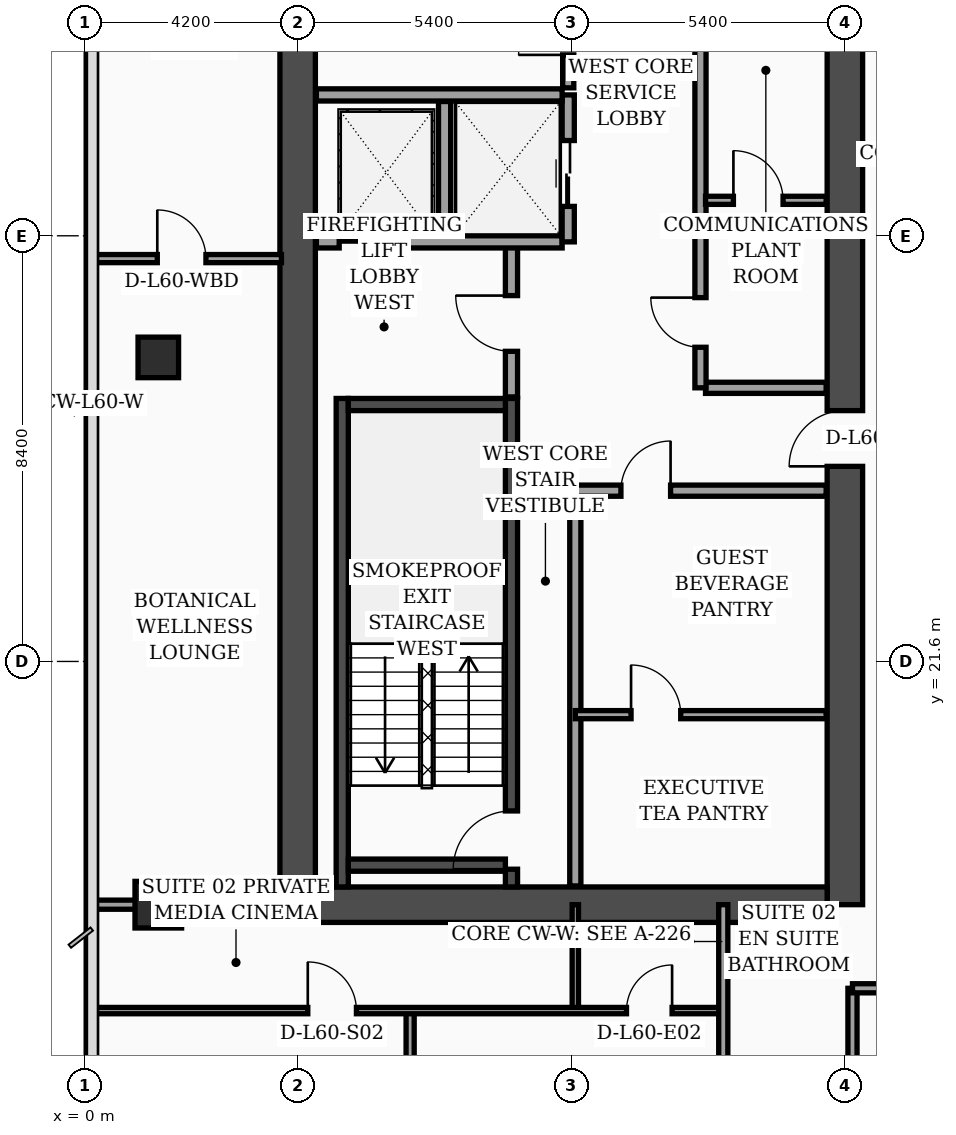
"""IFC4 building model, lengths in metres.
Left out: names, types, materials, properties, quantities, classifications, styles, units other than length and angle.
Written with IfcOpenShell. Run it as: python <this file> out.ifc"""

import sys

from ifc_helpers import new_model, si_unit, direction, frame, frame_2d, origin, origin_2d, place, context, subcontext, project, spatial, rectangle, extrude, element, fill, save


model = new_model("IFC4")
c1 = context("Model", 3, precision=1e-05, world=origin(), true_north=direction((0.0, 1.0)))
c2 = subcontext(c1, "Body", "Model", "MODEL_VIEW")
j1 = project(units=[si_unit("LENGTHUNIT", "METRE"), si_unit("PLANEANGLEUNIT", "RADIAN")], contexts=[c1])
p1 = place(None, origin())
s1 = spatial("IfcSite", under=j1, at=p1, CompositionType="ELEMENT")
p2 = place(p1, origin())
s2 = spatial("IfcBuilding", under=s1, at=p2, CompositionType="ELEMENT")
p3 = place(p2, frame((0.0, 0.0, 243.8)))
s3 = spatial("IfcBuildingStorey", under=s2, at=p3, CompositionType="ELEMENT", Elevation=243.8)
p4 = place(p3, frame((4.2, 16.8, 0.0), z_axis=(0.0, 0.0, 1.0), x_axis=(0.0, 1.0, 0.0)))
e1 = element("IfcWall", 1, at=p4, inside=s3, PredefinedType="SHEAR", context=c2, shape_type="SweptSolid", body=[
    extrude(rectangle(XDim=21.6, YDim=0.7, at=frame_2d((10.8, 0.0))), origin(), (0.0, 0.0, 1.0), 3.56),
])
p5 = place(p3, frame((15.0, 16.8, 0.0), z_axis=(0.0, 0.0, 1.0), x_axis=(0.0, 1.0, 0.0)))
e2 = element("IfcWall", 2, at=p5, inside=s3, PredefinedType="SHEAR", context=c2, shape_type="SweptSolid", body=[
    extrude(rectangle(XDim=21.6, YDim=0.7, at=frame_2d((10.8, 0.0))), origin(), (0.0, 0.0, 1.0), 3.56),
])
p6 = place(p5, frame((8.65, 0.0, 0.0)))
e3 = element("IfcOpeningElement", 3, at=p6, cuts=e2, PredefinedType="OPENING", context=c2, shape_type="SweptSolid", body=[
    extrude(rectangle(XDim=1.1, YDim=2.2, at=frame_2d((0.55, 1.1))), frame((0.0, 0.36, 0.0), z_axis=(0.0, -1.0, 0.0), x_axis=(1.0, 0.0, 0.0)), (0.0, 0.0, 1.0), 0.72),
])
p7 = place(p5, frame((18.9, 0.0, 0.0)))
e4 = element("IfcOpeningElement", 4, at=p7, cuts=e2, PredefinedType="OPENING", context=c2, shape_type="SweptSolid", body=[
    extrude(rectangle(XDim=1.1, YDim=2.2, at=frame_2d((0.55, 1.1))), frame((0.0, 0.36, 0.0), z_axis=(0.0, -1.0, 0.0), x_axis=(1.0, 0.0, 0.0)), (0.0, 0.0, 1.0), 0.72),
])
p8 = place(p3, frame((4.55, 16.8, 0.0), z_axis=(0.0, 0.0, 1.0), x_axis=(1.0, 0.0, 0.0)))
e5 = element("IfcWall", 5, at=p8, inside=s3, PredefinedType="SHEAR", context=c2, shape_type="SweptSolid", body=[
    extrude(rectangle(XDim=10.1, YDim=0.7, at=frame_2d((5.05, 0.0))), origin(), (0.0, 0.0, 1.0), 3.56),
])
p9 = place(p3, frame((5.08, 17.15, 0.0), z_axis=(0.0, 0.0, 1.0), x_axis=(0.0, 1.0, 0.0)))
e6 = element("IfcWall", 6, at=p9, inside=s3, PredefinedType="SOLIDWALL", context=c2, shape_type="SweptSolid", body=[
    extrude(rectangle(XDim=9.64, YDim=0.24, at=frame_2d((4.82, 0.0))), origin(), (0.0, 0.0, 1.0), 3.56),
])
p10 = place(p3, frame((8.42, 17.15, 0.0), z_axis=(0.0, 0.0, 1.0), x_axis=(0.0, 1.0, 0.0)))
e7 = element("IfcWall", 7, at=p10, inside=s3, PredefinedType="SOLIDWALL", context=c2, shape_type="SweptSolid", body=[
    extrude(rectangle(XDim=9.64, YDim=0.24, at=frame_2d((4.82, 0.0))), origin(), (0.0, 0.0, 1.0), 3.56),
])
p11 = place(p10, frame((0.35, 0.0, 0.0)))
e8 = element("IfcOpeningElement", 8, at=p11, cuts=e7, PredefinedType="OPENING", context=c2, shape_type="SweptSolid", body=[
    extrude(rectangle(XDim=1.15, YDim=2.2, at=frame_2d((0.575, 1.1))), frame((0.0, 0.13, 0.0), z_axis=(0.0, -1.0, 0.0), x_axis=(1.0, 0.0, 0.0)), (0.0, 0.0, 1.0), 0.26),
])
for number, where, z_axis, x_axis in (
    (9, (5.2, 17.58, 0.0), (0.0, 0.0, 1.0), (1.0, 0.0, 0.0)),
    (10, (5.2, 26.67, 0.0), (0.0, 0.0, 1.0), (1.0, 0.0, 0.0)),
):
    element("IfcWall", number, at=place(p3, frame(where, z_axis=z_axis, x_axis=x_axis)), inside=s3, PredefinedType="SOLIDWALL", context=c2, shape_type="SweptSolid", body=[
        extrude(rectangle(XDim=3.1, YDim=0.24, at=frame_2d((1.55, 0.0))), origin(), (0.0, 0.0, 1.0), 3.56),
    ])
p12 = place(p3, frame((1.45, 16.8, 0.0), z_axis=(0.0, 0.0, 1.0), x_axis=(1.0, 0.0, 0.0)))
e11 = element("IfcColumn", 11, at=p12, inside=s3, PredefinedType="COLUMN", context=c2, shape_type="SweptSolid", body=[
    extrude(rectangle(XDim=0.92, YDim=0.92, at=origin_2d()), origin(), (0.0, 0.0, 1.0), 3.56),
])
p13 = place(p3, frame((1.45, 27.6, 0.0), z_axis=(0.0, 0.0, 1.0), x_axis=(1.0, 0.0, 0.0)))
e12 = element("IfcColumn", 12, at=p13, inside=s3, PredefinedType="COLUMN", context=c2, shape_type="SweptSolid", body=[
    extrude(rectangle(XDim=0.8, YDim=0.8, at=origin_2d()), origin(), (0.0, 0.0, 1.0), 3.56),
])
p14 = place(p3, frame((8.42, 26.82, 0.0), z_axis=(0.0, 0.0, 1.0), x_axis=(0.0, 1.0, 0.0)))
e13 = element("IfcWall", 13, at=p14, inside=s3, PredefinedType="SOLIDWALL", context=c2, shape_type="SweptSolid", body=[
    extrude(rectangle(XDim=3.0, YDim=0.24, at=frame_2d((1.5, 0.0))), origin(), (0.0, 0.0, 1.0), 3.56),
])
p15 = place(p14, frame((0.9, 0.0, 0.0)))
e14 = element("IfcOpeningElement", 14, at=p15, cuts=e13, PredefinedType="OPENING", context=c2, shape_type="SweptSolid", body=[
    extrude(rectangle(XDim=1.1, YDim=2.2, at=frame_2d((0.55, 1.1))), frame((0.0, 0.13, 0.0), z_axis=(0.0, -1.0, 0.0), x_axis=(1.0, 0.0, 0.0)), (0.0, 0.0, 1.0), 0.26),
])
p16 = place(p3, frame((4.57, 29.88, 0.0), z_axis=(0.0, 0.0, 1.0), x_axis=(1.0, 0.0, 0.0)))
e15 = element("IfcWall", 15, at=p16, inside=s3, PredefinedType="SOLIDWALL", context=c2, shape_type="SweptSolid", body=[
    extrude(rectangle(XDim=4.85, YDim=0.24, at=frame_2d((2.425, 0.0))), origin(), (0.0, 0.0, 1.0), 3.56),
])
p17 = place(p16, frame((0.45, 0.0, 0.0)))
e16 = element("IfcOpeningElement", 16, at=p17, cuts=e15, PredefinedType="OPENING", context=c2, shape_type="SweptSolid", body=[
    extrude(rectangle(XDim=1.3, YDim=2.35, at=frame_2d((0.65, 1.175))), frame((0.0, 0.13, 0.0), z_axis=(0.0, -1.0, 0.0), x_axis=(1.0, 0.0, 0.0)), (0.0, 0.0, 1.0), 0.26),
])
p18 = place(p3, frame((7.1, 30.02, 0.0), z_axis=(0.0, 0.0, 1.0), x_axis=(0.0, 1.0, 0.0)))
e17 = element("IfcWall", 17, at=p18, inside=s3, PredefinedType="SOLIDWALL", context=c2, shape_type="SweptSolid", body=[
    extrude(rectangle(XDim=2.63, YDim=0.24, at=frame_2d((1.315, 0.0))), origin(), (0.0, 0.0, 1.0), 3.56),
])
p19 = place(p3, frame((9.54, 29.88, 0.0), z_axis=(0.0, 0.0, 1.0), x_axis=(0.0, 1.0, 0.0)))
e18 = element("IfcWall", 18, at=p19, inside=s3, PredefinedType="SOLIDWALL", context=c2, shape_type="SweptSolid", body=[
    extrude(rectangle(XDim=2.9, YDim=0.24, at=frame_2d((1.45, 0.0))), origin(), (0.0, 0.0, 1.0), 3.56),
])
p20 = place(p19, frame((0.7, 0.0, 0.0)))
e19 = element("IfcOpeningElement", 19, at=p20, cuts=e18, PredefinedType="OPENING", context=c2, shape_type="SweptSolid", body=[
    extrude(rectangle(XDim=1.3, YDim=2.35, at=frame_2d((0.65, 1.175))), frame((0.0, 0.13, 0.0), z_axis=(0.0, -1.0, 0.0), x_axis=(1.0, 0.0, 0.0)), (0.0, 0.0, 1.0), 0.26),
])
p21 = place(p3, frame((4.57, 32.78, 0.0), z_axis=(0.0, 0.0, 1.0), x_axis=(1.0, 0.0, 0.0)))
e20 = element("IfcWall", 20, at=p21, inside=s3, PredefinedType="SOLIDWALL", context=c2, shape_type="SweptSolid", body=[
    extrude(rectangle(XDim=4.85, YDim=0.24, at=frame_2d((2.425, 0.0))), origin(), (0.0, 0.0, 1.0), 3.19),
])
p22 = place(p3, frame((9.68, 17.17, 0.0), z_axis=(0.0, 0.0, 1.0), x_axis=(0.0, 1.0, 0.0)))
e21 = element("IfcWall", 21, at=p22, inside=s3, PredefinedType="SOLIDWALL", context=c2, shape_type="SweptSolid", body=[
    extrude(rectangle(XDim=7.83, YDim=0.22, at=frame_2d((3.915, 0.0))), origin(), (0.0, 0.0, 1.0), 3.56),
])
p23 = place(p3, frame((9.54, 32.92, 0.0), z_axis=(0.0, 0.0, 1.0), x_axis=(0.0, 1.0, 0.0)))
e22 = element("IfcWall", 22, at=p23, inside=s3, PredefinedType="SOLIDWALL", context=c2, shape_type="SweptSolid", body=[
    extrude(rectangle(XDim=5.11, YDim=0.22, at=frame_2d((2.555, 0.0))), origin(), (0.0, 0.0, 1.0), 3.56),
])
p24 = place(p23, frame((0.65, 0.0, 0.0)))
e23 = element("IfcOpeningElement", 23, at=p24, cuts=e22, PredefinedType="OPENING", context=c2, shape_type="SweptSolid", body=[
    extrude(rectangle(XDim=0.98, YDim=2.15, at=frame_2d((0.49, 1.075))), frame((0.0, 0.12, 0.0), z_axis=(0.0, -1.0, 0.0), x_axis=(1.0, 0.0, 0.0)), (0.0, 0.0, 1.0), 0.24),
])
p25 = place(p3, frame((9.68, 20.55, 0.0), z_axis=(0.0, 0.0, 1.0), x_axis=(1.0, 0.0, 0.0)))
e24 = element("IfcWall", 24, at=p25, inside=s3, PredefinedType="PARTITIONING", context=c2, shape_type="SweptSolid", body=[
    extrude(rectangle(XDim=4.95, YDim=0.16, at=frame_2d((2.475, 0.0))), origin(), (0.0, 0.0, 1.0), 3.56),
])
p26 = place(p25, frame((1.1, 0.0, 0.0)))
e25 = element("IfcOpeningElement", 25, at=p26, cuts=e24, PredefinedType="OPENING", context=c2, shape_type="SweptSolid", body=[
    extrude(rectangle(XDim=0.98, YDim=2.15, at=frame_2d((0.49, 1.075))), frame((0.0, 0.09, 0.0), z_axis=(0.0, -1.0, 0.0), x_axis=(1.0, 0.0, 0.0)), (0.0, 0.0, 1.0), 0.18),
])
p27 = place(p3, frame((9.68, 24.97, 0.0), z_axis=(0.0, 0.0, 1.0), x_axis=(1.0, 0.0, 0.0)))
e26 = element("IfcWall", 26, at=p27, inside=s3, PredefinedType="SOLIDWALL", context=c2, shape_type="SweptSolid", body=[
    extrude(rectangle(XDim=4.95, YDim=0.22, at=frame_2d((2.475, 0.0))), origin(), (0.0, 0.0, 1.0), 2.99),
])
p28 = place(p27, frame((0.9, 0.0, 0.0)))
e27 = element("IfcOpeningElement", 27, at=p28, cuts=e26, PredefinedType="OPENING", context=c2, shape_type="SweptSolid", body=[
    extrude(rectangle(XDim=0.98, YDim=2.15, at=frame_2d((0.49, 1.075))), frame((0.0, 0.12, 0.0), z_axis=(0.0, -1.0, 0.0), x_axis=(1.0, 0.0, 0.0)), (0.0, 0.0, 1.0), 0.24),
])
p29 = place(p3, frame((12.25, 27.0, 0.0), z_axis=(0.0, 0.0, 1.0), x_axis=(1.0, 0.0, 0.0)))
e28 = element("IfcWall", 28, at=p29, inside=s3, PredefinedType="SOLIDWALL", context=c2, shape_type="SweptSolid", body=[
    extrude(rectangle(XDim=2.38, YDim=0.22, at=frame_2d((1.19, 0.0))), origin(), (0.0, 0.0, 1.0), 3.56),
])
p30 = place(p3, frame((12.15, 27.0, 0.0), z_axis=(0.0, 0.0, 1.0), x_axis=(0.0, 1.0, 0.0)))
e29 = element("IfcWall", 29, at=p30, inside=s3, PredefinedType="SOLIDWALL", context=c2, shape_type="SweptSolid", body=[
    extrude(rectangle(XDim=7.75, YDim=0.22, at=frame_2d((3.875, 0.0))), origin(), (0.0, 0.0, 1.0), 3.56),
])
p31 = place(p30, frame((0.8, 0.0, 0.0)))
e30 = element("IfcOpeningElement", 30, at=p31, cuts=e29, PredefinedType="OPENING", context=c2, shape_type="SweptSolid", body=[
    extrude(rectangle(XDim=0.98, YDim=2.15, at=frame_2d((0.49, 1.075))), frame((0.0, 0.12, 0.0), z_axis=(0.0, -1.0, 0.0), x_axis=(1.0, 0.0, 0.0)), (0.0, 0.0, 1.0), 0.24),
])
p32 = place(p3, frame((12.25, 30.7, 0.0), z_axis=(0.0, 0.0, 1.0), x_axis=(1.0, 0.0, 0.0)))
e31 = element("IfcWall", 31, at=p32, inside=s3, PredefinedType="PARTITIONING", context=c2, shape_type="SweptSolid", body=[
    extrude(rectangle(XDim=2.38, YDim=0.16, at=frame_2d((1.19, 0.0))), origin(), (0.0, 0.0, 1.0), 3.56),
])
p33 = place(p32, frame((0.55, 0.0, 0.0)))
e32 = element("IfcOpeningElement", 32, at=p33, cuts=e31, PredefinedType="OPENING", context=c2, shape_type="SweptSolid", body=[
    extrude(rectangle(XDim=0.98, YDim=2.15, at=frame_2d((0.49, 1.075))), frame((0.0, 0.09, 0.0), z_axis=(0.0, -1.0, 0.0), x_axis=(1.0, 0.0, 0.0)), (0.0, 0.0, 1.0), 0.18),
])
p34 = place(p3, frame((0.08, 29.55, 0.0), z_axis=(0.0, 0.0, 1.0), x_axis=(1.0, 0.0, 0.0)))
e33 = element("IfcWall", 33, at=p34, inside=s3, PredefinedType="PARTITIONING", context=c2, shape_type="SweptSolid", body=[
    extrude(rectangle(XDim=3.8, YDim=0.16, at=frame_2d((1.9, 0.0))), origin(), (0.0, 0.0, 1.0), 3.09),
])
p35 = place(p34, frame((1.35, 0.0, 0.0)))
e34 = element("IfcOpeningElement", 34, at=p35, cuts=e33, PredefinedType="OPENING", context=c2, shape_type="SweptSolid", body=[
    extrude(rectangle(XDim=0.96, YDim=2.2, at=frame_2d((0.48, 1.1))), frame((0.0, 0.09, 0.0), z_axis=(0.0, -1.0, 0.0), x_axis=(1.0, 0.0, 0.0)), (0.0, 0.0, 1.0), 0.18),
])
p36 = place(p3, frame((0.08, 16.8, 0.0), z_axis=(0.0, 0.0, 1.0), x_axis=(1.0, 0.0, 0.0)))
e35 = element("IfcWall", 35, at=p36, inside=s3, PredefinedType="PARTITIONING", context=c2, shape_type="SweptSolid", body=[
    extrude(rectangle(XDim=3.8, YDim=0.18, at=frame_2d((1.9, 0.0))), origin(), (0.0, 0.0, 1.0), 2.99),
])
p37 = place(p3, frame((9.68, 14.71, 0.0), z_axis=(0.0, 0.0, 1.0), x_axis=(0.0, 1.0, 0.0)))
e36 = element("IfcWall", 36, at=p37, inside=s3, PredefinedType="PARTITIONING", context=c2, shape_type="SweptSolid", body=[
    extrude(rectangle(XDim=2.09, YDim=0.125, at=frame_2d((1.045, 0.0))), origin(), (0.0, 0.0, 1.0), 3.56),
])
p38 = place(p3, frame((6.42, 9.25, 0.0), z_axis=(0.0, 0.0, 1.0), x_axis=(0.0, 1.0, 0.0)))
e37 = element("IfcWall", 37, at=p38, inside=s3, PredefinedType="PARTITIONING", context=c2, shape_type="SweptSolid", body=[
    extrude(rectangle(XDim=5.46, YDim=0.16, at=frame_2d((2.73, 0.0))), origin(), (0.0, 0.0, 1.0), 3.14),
])
p39 = place(p38, frame((2.25, 0.0, 0.0)))
e38 = element("IfcOpeningElement", 38, at=p39, cuts=e37, PredefinedType="OPENING", context=c2, shape_type="SweptSolid", body=[
    extrude(rectangle(XDim=0.96, YDim=2.2, at=frame_2d((0.48, 1.1))), frame((0.0, 0.09, 0.0), z_axis=(0.0, -1.0, 0.0), x_axis=(1.0, 0.0, 0.0)), (0.0, 0.0, 1.0), 0.18),
])
p40 = place(p3, frame((0.08, 14.71, 0.0), z_axis=(0.0, 0.0, 1.0), x_axis=(1.0, 0.0, 0.0)))
e39 = element("IfcWall", 39, at=p40, inside=s3, PredefinedType="PARTITIONING", context=c2, shape_type="SweptSolid", body=[
    extrude(rectangle(XDim=12.52, YDim=0.125, at=frame_2d((6.26, 0.0))), origin(), (0.0, 0.0, 1.0), 2.99),
])
p41 = place(p40, frame((4.32, 0.0, 0.0)))
e40 = element("IfcOpeningElement", 40, at=p41, cuts=e39, PredefinedType="OPENING", context=c2, shape_type="SweptSolid", body=[
    extrude(rectangle(XDim=0.96, YDim=2.2, at=frame_2d((0.48, 1.1))), frame((0.0, 0.073, 0.0), z_axis=(0.0, -1.0, 0.0), x_axis=(1.0, 0.0, 0.0)), (0.0, 0.0, 1.0), 0.145),
])
p42 = place(p40, frame((10.61, 0.0, 0.0)))
e41 = element("IfcOpeningElement", 41, at=p42, cuts=e39, PredefinedType="OPENING", context=c2, shape_type="SweptSolid", body=[
    extrude(rectangle(XDim=0.9, YDim=2.15, at=frame_2d((0.45, 1.075))), frame((0.0, 0.073, 0.0), z_axis=(0.0, -1.0, 0.0), x_axis=(1.0, 0.0, 0.0)), (0.0, 0.0, 1.0), 0.145),
])
p43 = place(p3, frame((12.6, 2.44, 0.0), z_axis=(0.0, 0.0, 1.0), x_axis=(0.0, 1.0, 0.0)))
e42 = element("IfcWall", 42, at=p43, inside=s3, PredefinedType="PARTITIONING", context=c2, shape_type="SweptSolid", body=[
    extrude(rectangle(XDim=14.36, YDim=0.18, at=frame_2d((7.18, 0.0))), origin(), (0.0, 0.0, 1.0), 2.99),
])
p44 = place(p43, frame((3.01, 0.0, 0.0)))
e43 = element("IfcOpeningElement", 43, at=p44, cuts=e42, PredefinedType="OPENING", context=c2, shape_type="SweptSolid", body=[
    extrude(rectangle(XDim=1.02, YDim=2.2, at=frame_2d((0.51, 1.1))), frame((0.0, 0.1, 0.0), z_axis=(0.0, -1.0, 0.0), x_axis=(1.0, 0.0, 0.0)), (0.0, 0.0, 1.0), 0.2),
])
p45 = place(p43, frame((9.03, 0.0, 0.0)))
e44 = element("IfcOpeningElement", 44, at=p45, cuts=e42, PredefinedType="OPENING", context=c2, shape_type="SweptSolid", body=[
    extrude(rectangle(XDim=1.02, YDim=2.2, at=frame_2d((0.51, 1.1))), frame((0.0, 0.1, 0.0), z_axis=(0.0, -1.0, 0.0), x_axis=(1.0, 0.0, 0.0)), (0.0, 0.0, 1.0), 0.2),
])
p46 = place(p3, frame((15.15, 2.44, 0.0), z_axis=(0.0, 0.0, 1.0), x_axis=(0.0, 1.0, 0.0)))
e45 = element("IfcWall", 45, at=p46, inside=s3, PredefinedType="PARTITIONING", context=c2, shape_type="SweptSolid", body=[
    extrude(rectangle(XDim=12.71, YDim=0.18, at=frame_2d((6.355, 0.0))), origin(), (0.0, 0.0, 1.0), 3.09),
])
p47 = place(p3, frame((15.15, 15.15, 0.0), z_axis=(0.0, 0.0, 1.0), x_axis=(1.0, 0.0, 0.0)))
e46 = element("IfcWall", 46, at=p47, inside=s3, PredefinedType="PARTITIONING", context=c2, shape_type="SweptSolid", body=[
    extrude(rectangle(XDim=6.45, YDim=0.18, at=frame_2d((3.225, 0.0))), origin(), (0.0, 0.0, 1.0), 2.59),
])
p48 = place(p47, frame((1.74, 0.0, 0.0)))
e47 = element("IfcOpeningElement", 47, at=p48, cuts=e46, PredefinedType="OPENING", context=c2, shape_type="SweptSolid", body=[
    extrude(rectangle(XDim=1.02, YDim=2.2, at=frame_2d((0.51, 1.1))), frame((0.0, 0.1, 0.0), z_axis=(0.0, -1.0, 0.0), x_axis=(1.0, 0.0, 0.0)), (0.0, 0.0, 1.0), 0.2),
])
p49 = place(p15, origin())
e48 = element("IfcDoor", 48, at=p49, inside=s3, OperationType="SINGLE_SWING_RIGHT", PredefinedType="DOOR", context=c2, shape_type="SweptSolid", body=[
    extrude(rectangle(XDim=1.1, YDim=2.2, at=frame_2d((0.55, 1.1))), frame((0.0, 0.025, 0.0), z_axis=(0.0, -1.0, 0.0), x_axis=(1.0, 0.0, 0.0)), (0.0, 0.0, 1.0), 0.05),
])
fill(e14, e48)
p50 = place(p17, origin())
e49 = element("IfcDoor", 49, at=p50, inside=s3, OperationType="DOUBLE_DOOR_SLIDING", PredefinedType="DOOR", context=c2, shape_type="SweptSolid", body=[
    extrude(rectangle(XDim=1.3, YDim=2.35, at=frame_2d((0.65, 1.175))), frame((0.0, 0.025, 0.0), z_axis=(0.0, -1.0, 0.0), x_axis=(1.0, 0.0, 0.0)), (0.0, 0.0, 1.0), 0.05),
])
fill(e16, e49)
p51 = place(p20, origin())
e50 = element("IfcDoor", 50, at=p51, inside=s3, OperationType="DOUBLE_DOOR_SLIDING", PredefinedType="DOOR", context=c2, shape_type="SweptSolid", body=[
    extrude(rectangle(XDim=1.3, YDim=2.35, at=frame_2d((0.65, 1.175))), frame((0.0, 0.025, 0.0), z_axis=(0.0, -1.0, 0.0), x_axis=(1.0, 0.0, 0.0)), (0.0, 0.0, 1.0), 0.05),
])
fill(e19, e50)
p52 = place(p24, origin())
e51 = element("IfcDoor", 51, at=p52, inside=s3, OperationType="SINGLE_SWING_LEFT", PredefinedType="DOOR", context=c2, shape_type="SweptSolid", body=[
    extrude(rectangle(XDim=0.98, YDim=2.15, at=frame_2d((0.49, 1.075))), frame((0.0, 0.025, 0.0), z_axis=(0.0, -1.0, 0.0), x_axis=(1.0, 0.0, 0.0)), (0.0, 0.0, 1.0), 0.05),
])
fill(e23, e51)
p53 = place(p26, origin())
e52 = element("IfcDoor", 52, at=p53, inside=s3, OperationType="SINGLE_SWING_LEFT", PredefinedType="DOOR", context=c2, shape_type="SweptSolid", body=[
    extrude(rectangle(XDim=0.98, YDim=2.15, at=frame_2d((0.49, 1.075))), frame((0.0, 0.025, 0.0), z_axis=(0.0, -1.0, 0.0), x_axis=(1.0, 0.0, 0.0)), (0.0, 0.0, 1.0), 0.05),
])
fill(e25, e52)
p54 = place(p28, origin())
e53 = element("IfcDoor", 53, at=p54, inside=s3, OperationType="SINGLE_SWING_RIGHT", PredefinedType="DOOR", context=c2, shape_type="SweptSolid", body=[
    extrude(rectangle(XDim=0.98, YDim=2.15, at=frame_2d((0.49, 1.075))), frame((0.0, 0.025, 0.0), z_axis=(0.0, -1.0, 0.0), x_axis=(1.0, 0.0, 0.0)), (0.0, 0.0, 1.0), 0.05),
])
fill(e27, e53)
p55 = place(p31, origin())
e54 = element("IfcDoor", 54, at=p55, inside=s3, OperationType="SINGLE_SWING_RIGHT", PredefinedType="DOOR", context=c2, shape_type="SweptSolid", body=[
    extrude(rectangle(XDim=0.98, YDim=2.15, at=frame_2d((0.49, 1.075))), frame((0.0, 0.025, 0.0), z_axis=(0.0, -1.0, 0.0), x_axis=(1.0, 0.0, 0.0)), (0.0, 0.0, 1.0), 0.05),
])
fill(e30, e54)
p56 = place(p33, origin())
e55 = element("IfcDoor", 55, at=p56, inside=s3, OperationType="SINGLE_SWING_LEFT", PredefinedType="DOOR", context=c2, shape_type="SweptSolid", body=[
    extrude(rectangle(XDim=0.98, YDim=2.15, at=frame_2d((0.49, 1.075))), frame((0.0, 0.025, 0.0), z_axis=(0.0, -1.0, 0.0), x_axis=(1.0, 0.0, 0.0)), (0.0, 0.0, 1.0), 0.05),
])
fill(e32, e55)
p57 = place(p35, origin())
e56 = element("IfcDoor", 56, at=p57, inside=s3, OperationType="SINGLE_SWING_LEFT", PredefinedType="DOOR", context=c2, shape_type="SweptSolid", body=[
    extrude(rectangle(XDim=0.96, YDim=2.2, at=frame_2d((0.48, 1.1))), frame((0.0, 0.025, 0.0), z_axis=(0.0, -1.0, 0.0), x_axis=(1.0, 0.0, 0.0)), (0.0, 0.0, 1.0), 0.05),
])
fill(e34, e56)
p58 = place(p41, origin())
e57 = element("IfcDoor", 57, at=p58, inside=s3, OperationType="SINGLE_SWING_LEFT", PredefinedType="DOOR", context=c2, shape_type="SweptSolid", body=[
    extrude(rectangle(XDim=0.96, YDim=2.2, at=frame_2d((0.48, 1.1))), frame((0.0, 0.025, 0.0), z_axis=(0.0, -1.0, 0.0), x_axis=(1.0, 0.0, 0.0)), (0.0, 0.0, 1.0), 0.05),
])
fill(e40, e57)
p59 = place(p42, origin())
e58 = element("IfcDoor", 58, at=p59, inside=s3, OperationType="SINGLE_SWING_RIGHT", PredefinedType="DOOR", context=c2, shape_type="SweptSolid", body=[
    extrude(rectangle(XDim=0.9, YDim=2.15, at=frame_2d((0.45, 1.075))), frame((0.0, 0.025, 0.0), z_axis=(0.0, -1.0, 0.0), x_axis=(1.0, 0.0, 0.0)), (0.0, 0.0, 1.0), 0.05),
])
fill(e41, e58)
p60 = place(p11, origin())
e59 = element("IfcDoor", 59, at=p60, inside=s3, OperationType="SINGLE_SWING_LEFT", PredefinedType="DOOR", context=c2, shape_type="SweptSolid", body=[
    extrude(rectangle(XDim=1.15, YDim=2.2, at=frame_2d((0.575, 1.1))), frame((0.0, 0.025, 0.0), z_axis=(0.0, -1.0, 0.0), x_axis=(1.0, 0.0, 0.0)), (0.0, 0.0, 1.0), 0.05),
])
fill(e8, e59)
p61 = place(p6, origin())
e60 = element("IfcDoor", 60, at=p61, inside=s3, OperationType="SINGLE_SWING_LEFT", PredefinedType="DOOR", context=c2, shape_type="SweptSolid", body=[
    extrude(rectangle(XDim=1.1, YDim=2.2, at=frame_2d((0.55, 1.1))), frame((0.0, 0.025, 0.0), z_axis=(0.0, -1.0, 0.0), x_axis=(1.0, 0.0, 0.0)), (0.0, 0.0, 1.0), 0.05),
])
fill(e3, e60)
save(model, sys.argv[1])
